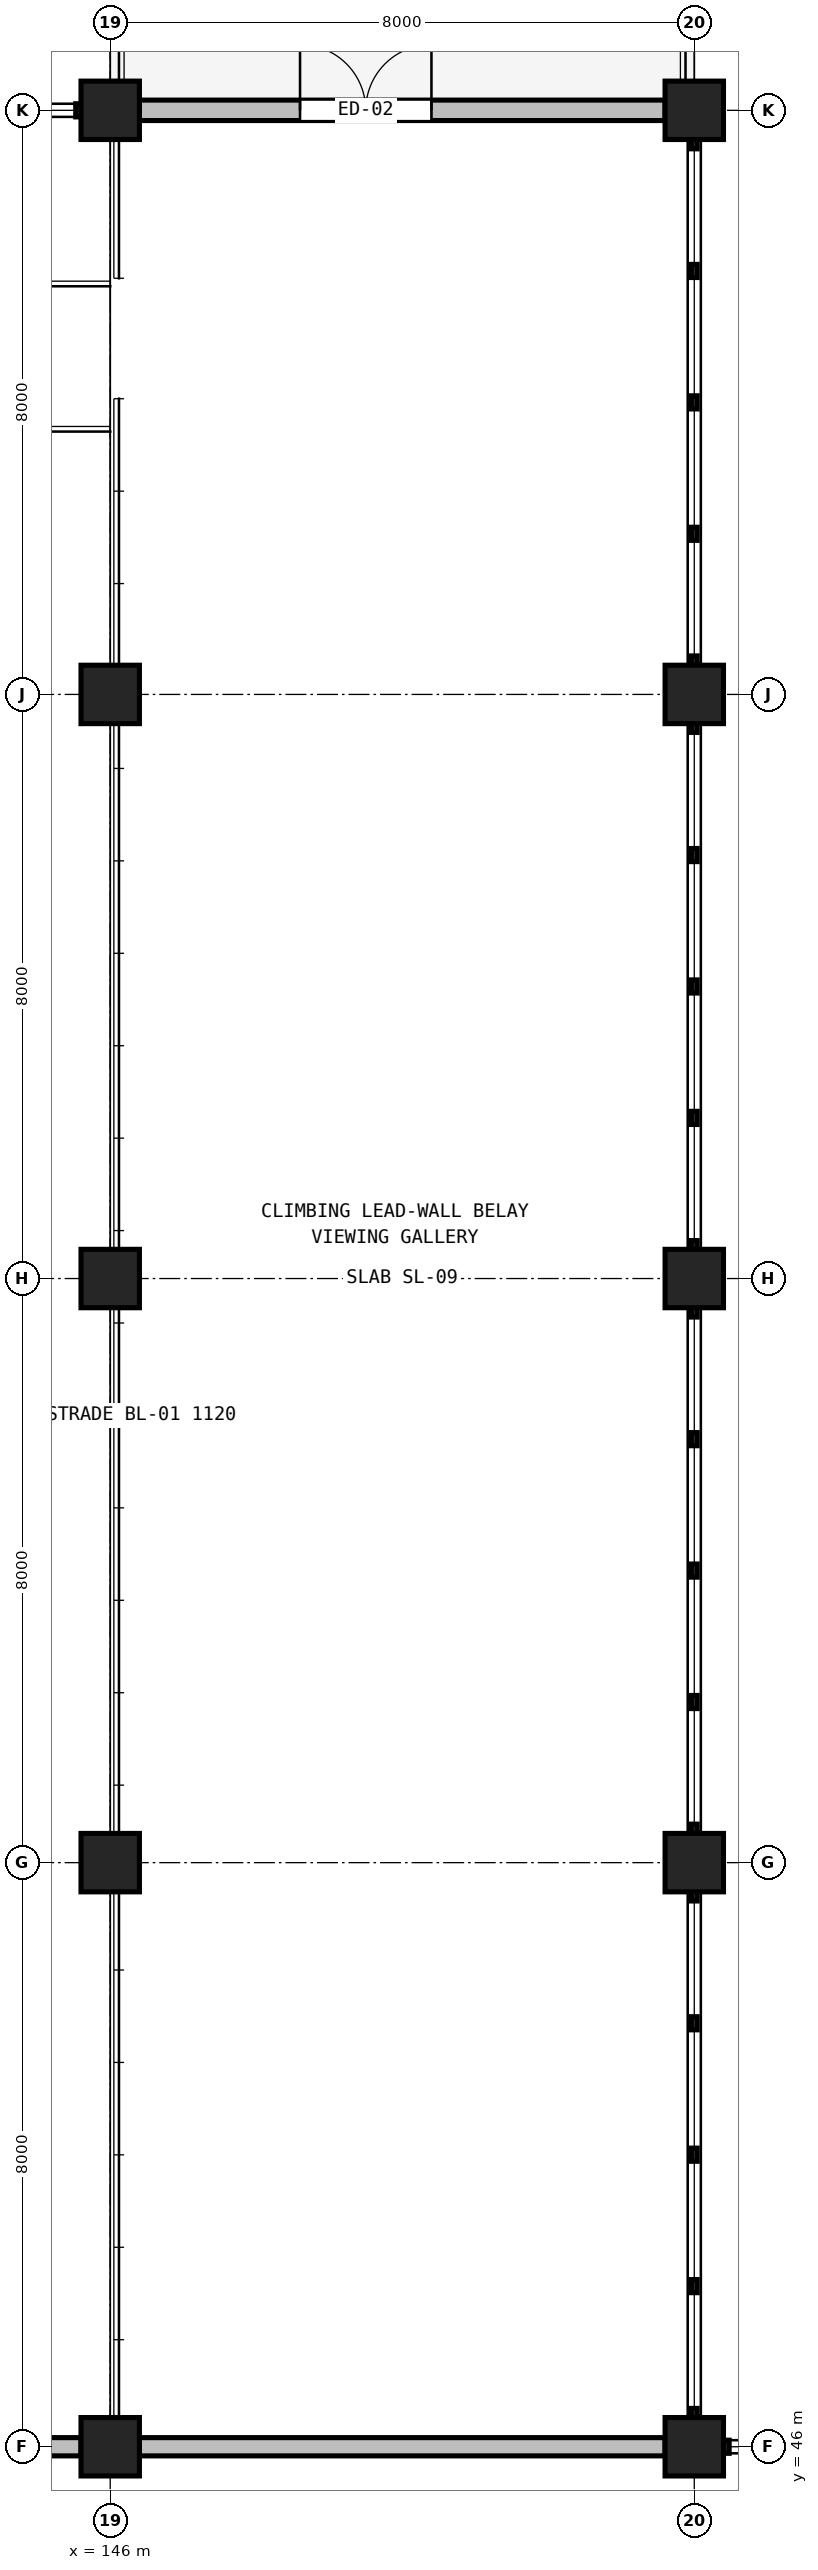
"""IFC4 building model, lengths in metres.
Left out: names, types, materials, properties, quantities, classifications, styles, units other than length and angle.
Written with IfcOpenShell. Run it as: python <this file> out.ifc"""

import sys

from ifc_helpers import new_model, si_unit, direction, frame, frame_2d, origin, origin_2d, place, context, subcontext, project, spatial, rectangle, extrude, element, fill, save


model = new_model("IFC4")
c1 = context("Model", 3, precision=1e-05, world=origin(), true_north=direction((0.0, 1.0)))
c2 = subcontext(c1, "Body", "Model", "MODEL_VIEW")
j1 = project(units=[si_unit("LENGTHUNIT", "METRE"), si_unit("PLANEANGLEUNIT", "RADIAN")], contexts=[c1])
p1 = place(None, origin())
s1 = spatial("IfcSite", under=j1, at=p1, CompositionType="ELEMENT")
p2 = place(p1, origin())
s2 = spatial("IfcBuilding", under=s1, at=p2, CompositionType="ELEMENT")
p3 = place(p2, frame((0.0, 0.0, 10.8)))
s3 = spatial("IfcBuildingStorey", under=s2, at=p3, CompositionType="ELEMENT", Elevation=10.8)
for number, where, z_axis, x_axis in (
    (1, (146.0, 46.0, 0.0), (0.0, 0.0, 1.0), (1.0, 0.0, 0.0)),
    (2, (146.0, 54.0, 0.0), (0.0, 0.0, 1.0), (1.0, 0.0, 0.0)),
    (3, (146.0, 62.0, 0.0), (0.0, 0.0, 1.0), (1.0, 0.0, 0.0)),
    (4, (146.0, 70.0, 0.0), (0.0, 0.0, 1.0), (1.0, 0.0, 0.0)),
    (5, (146.0, 78.0, 0.0), (0.0, 0.0, 1.0), (1.0, 0.0, 0.0)),
    (6, (154.0, 46.0, 0.0), (0.0, 0.0, 1.0), (1.0, 0.0, 0.0)),
    (7, (154.0, 54.0, 0.0), (0.0, 0.0, 1.0), (1.0, 0.0, 0.0)),
    (8, (154.0, 62.0, 0.0), (0.0, 0.0, 1.0), (1.0, 0.0, 0.0)),
    (9, (154.0, 70.0, 0.0), (0.0, 0.0, 1.0), (1.0, 0.0, 0.0)),
    (10, (154.0, 78.0, 0.0), (0.0, 0.0, 1.0), (1.0, 0.0, 0.0)),
):
    element("IfcColumn", number, at=place(p3, frame(where, z_axis=z_axis, x_axis=x_axis)), inside=s3, PredefinedType="COLUMN", context=c2, shape_type="SweptSolid", body=[
        extrude(rectangle(XDim=0.8, YDim=0.8, at=origin_2d()), origin(), (0.0, 0.0, 1.0), 4.2),
    ])
for number, where, z_axis, x_axis in (
    (11, (138.4, 46.0, -0.27), (0.0, 0.0, 1.0), (1.0, 0.0, 0.0)),
    (12, (146.4, 46.0, -0.27), (0.0, 0.0, 1.0), (1.0, 0.0, 0.0)),
):
    element("IfcWall", number, at=place(p3, frame(where, z_axis=z_axis, x_axis=x_axis)), inside=s3, PredefinedType="SOLIDWALL", context=c2, shape_type="SweptSolid", body=[
        extrude(rectangle(XDim=7.2, YDim=0.25, at=frame_2d((3.6, 0.0))), origin(), (0.0, 0.0, 1.0), 3.81),
    ])
p4 = place(p3, frame((146.4, 78.0, 0.0), z_axis=(0.0, 0.0, 1.0), x_axis=(1.0, 0.0, 0.0)))
e13 = element("IfcWall", 13, at=p4, inside=s3, PredefinedType="SOLIDWALL", context=c2, shape_type="SweptSolid", body=[
    extrude(rectangle(XDim=7.2, YDim=0.28, at=frame_2d((3.6, 0.0))), origin(), (0.0, 0.0, 1.0), 3.31),
])
p5 = place(p4, frame((2.2, 0.0, 0.0)))
e14 = element("IfcOpeningElement", 14, at=p5, cuts=e13, PredefinedType="OPENING", context=c2, shape_type="SweptSolid", body=[
    extrude(rectangle(XDim=1.8, YDim=2.3, at=frame_2d((0.9, 1.15))), frame((0.0, 0.15, 0.0), z_axis=(0.0, -1.0, 0.0), x_axis=(1.0, 0.0, 0.0)), (0.0, 0.0, 1.0), 0.3),
])
p6 = place(p5, origin())
e15 = element("IfcDoor", 15, at=p6, inside=s3, OperationType="DOUBLE_DOOR_SINGLE_SWING", PredefinedType="DOOR", context=c2, shape_type="SweptSolid", body=[
    extrude(rectangle(XDim=1.8, YDim=2.3, at=frame_2d((0.9, 1.15))), frame((0.0, 0.025, 0.0), z_axis=(0.0, -1.0, 0.0), x_axis=(1.0, 0.0, 0.0)), (0.0, 0.0, 1.0), 0.05),
])
fill(e14, e15)
save(model, sys.argv[1])
